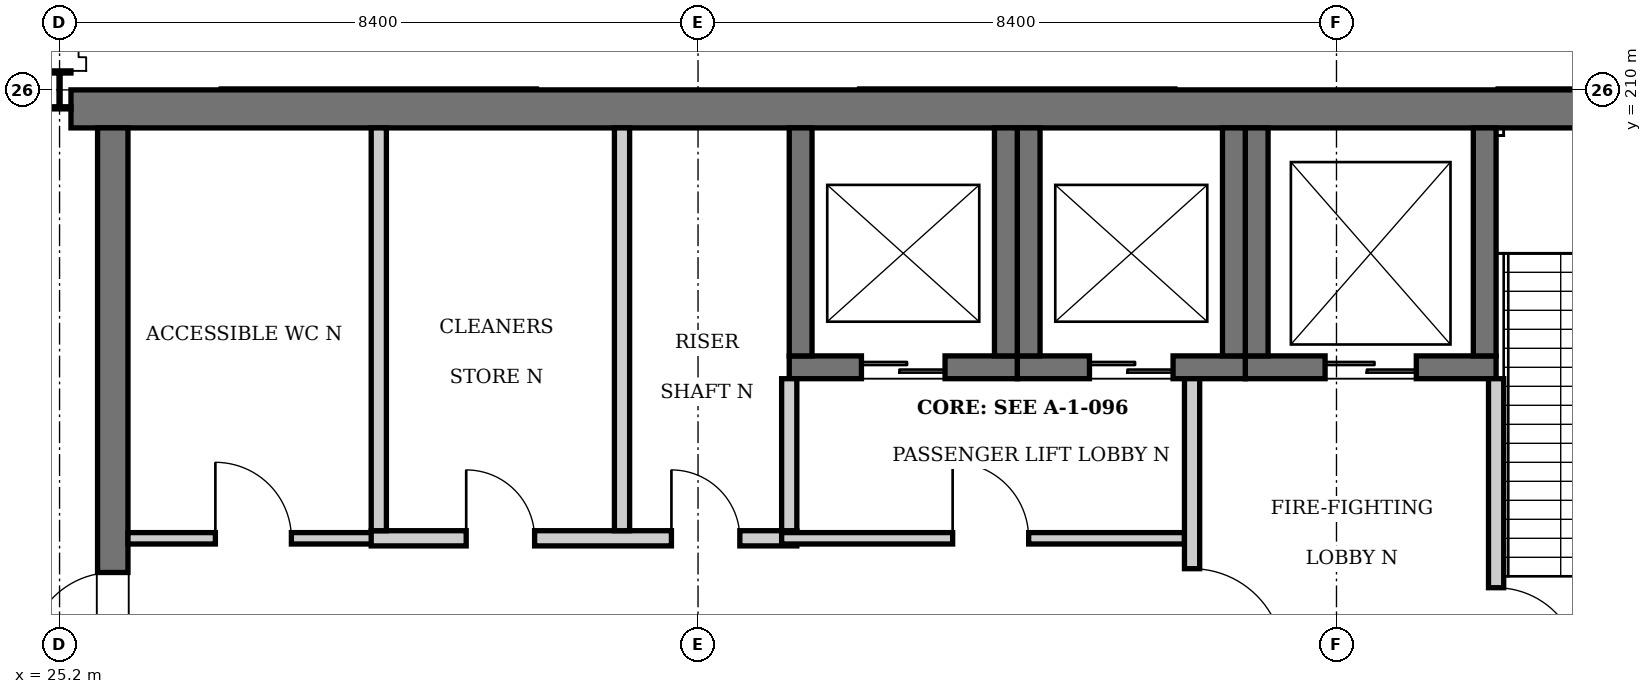
"""IFC4 building model, lengths in metres.
Left out: names, types, materials, properties, quantities, classifications, styles, units other than length and angle.
Written with IfcOpenShell. Run it as: python <this file> out.ifc"""

import sys

from ifc_helpers import new_model, si_unit, direction, frame, frame_2d, origin, origin_2d, place, context, subcontext, project, spatial, rectangle, i_section, extrude, element, fill, save


model = new_model("IFC4")
c1 = context("Model", 3, precision=1e-05, world=origin(), true_north=direction((0.0, 1.0)))
c2 = subcontext(c1, "Body", "Model", "MODEL_VIEW")
j1 = project(units=[si_unit("LENGTHUNIT", "METRE"), si_unit("PLANEANGLEUNIT", "RADIAN")], contexts=[c1])
p1 = place(None, origin())
s1 = spatial("IfcSite", under=j1, at=p1, CompositionType="ELEMENT")
p2 = place(p1, origin())
s2 = spatial("IfcBuilding", under=s1, at=p2, CompositionType="ELEMENT")
p3 = place(p2, origin())
s3 = spatial("IfcBuildingStorey", under=s2, at=p3, CompositionType="ELEMENT", Elevation=0.0)
p4 = place(p3, frame((25.2, 210.0, -0.7), z_axis=(0.0, 0.0, 1.0), x_axis=(1.0, 0.0, 0.0)))
e1 = element("IfcColumn", 1, at=p4, inside=s3, PredefinedType="COLUMN", context=c2, shape_type="SweptSolid", body=[
    extrude(i_section(OverallWidth=0.3, OverallDepth=0.5, WebThickness=0.014, FlangeThickness=0.028, at=origin_2d()), origin(), (0.0, 0.0, 1.0), 6.7),
])
p5 = place(p3, frame((25.35, 209.75, -0.7), z_axis=(0.0, 0.0, 1.0), x_axis=(1.0, 0.0, 0.0)))
e2 = element("IfcWall", 2, at=p5, inside=s3, PredefinedType="SHEAR", context=c2, shape_type="SweptSolid", body=[
    extrude(rectangle(XDim=25.043, YDim=0.5, at=frame_2d((12.521, 0.0))), origin(), (0.0, 0.0, 1.0), 6.7),
])
p6 = place(p3, frame((25.9, 202.1, -0.7), z_axis=(0.0, 0.0, 1.0), x_axis=(0.0, 1.0, 0.0)))
e3 = element("IfcWall", 3, at=p6, inside=s3, PredefinedType="SHEAR", context=c2, shape_type="SweptSolid", body=[
    extrude(rectangle(XDim=7.4, YDim=0.4, at=frame_2d((3.7, 0.0))), origin(), (0.0, 0.0, 1.0), 6.7),
])
p7 = place(p6, frame((0.45, 0.0, 0.7)))
e4 = element("IfcOpeningElement", 4, at=p7, cuts=e3, PredefinedType="OPENING", context=c2, shape_type="SweptSolid", body=[
    extrude(rectangle(XDim=1.1, YDim=2.4, at=frame_2d((0.55, 1.2))), frame((0.0, 0.21, 0.0), z_axis=(0.0, -1.0, 0.0), x_axis=(1.0, 0.0, 0.0)), (0.0, 0.0, 1.0), 0.42),
])
p8 = place(p3, frame((40.8, 206.35, -1.8), z_axis=(0.0, 0.0, 1.0), x_axis=(1.0, 0.0, 0.0)))
e5 = element("IfcWall", 5, at=p8, inside=s3, PredefinedType="SHEAR", context=c2, shape_type="SweptSolid", body=[
    extrude(rectangle(XDim=3.3, YDim=0.3, at=frame_2d((1.65, 0.0))), origin(), (0.0, 0.0, 1.0), 7.8),
])
p9 = place(p8, frame((1.05, 0.0, 1.8)))
e6 = element("IfcOpeningElement", 6, at=p9, cuts=e5, PredefinedType="OPENING", context=c2, shape_type="SweptSolid", body=[
    extrude(rectangle(XDim=1.2, YDim=2.1, at=frame_2d((0.6, 1.05))), frame((0.0, 0.16, 0.0), z_axis=(0.0, -1.0, 0.0), x_axis=(1.0, 0.0, 0.0)), (0.0, 0.0, 1.0), 0.32),
])
for number, where, z_axis, x_axis in (
    (7, (43.95, 206.5, -1.8), (0.0, 0.0, 1.0), (0.0, 1.0, 0.0)),
    (8, (40.95, 206.5, -1.8), (0.0, 0.0, 1.0), (0.0, 1.0, 0.0)),
):
    element("IfcWall", number, at=place(p3, frame(where, z_axis=z_axis, x_axis=x_axis)), inside=s3, PredefinedType="SHEAR", context=c2, shape_type="SweptSolid", body=[
        extrude(rectangle(XDim=3.0, YDim=0.3, at=frame_2d((1.5, 0.0))), origin(), (0.0, 0.0, 1.0), 7.8),
    ])
p10 = place(p3, frame((37.8, 206.35, -1.8), z_axis=(0.0, 0.0, 1.0), x_axis=(1.0, 0.0, 0.0)))
e9 = element("IfcWall", 9, at=p10, inside=s3, PredefinedType="SHEAR", context=c2, shape_type="SweptSolid", body=[
    extrude(rectangle(XDim=3.0, YDim=0.3, at=frame_2d((1.5, 0.0))), origin(), (0.0, 0.0, 1.0), 7.8),
])
p11 = place(p10, frame((0.95, 0.0, 1.8)))
e10 = element("IfcOpeningElement", 10, at=p11, cuts=e9, PredefinedType="OPENING", context=c2, shape_type="SweptSolid", body=[
    extrude(rectangle(XDim=1.1, YDim=2.1, at=frame_2d((0.55, 1.05))), frame((0.0, 0.16, 0.0), z_axis=(0.0, -1.0, 0.0), x_axis=(1.0, 0.0, 0.0)), (0.0, 0.0, 1.0), 0.32),
])
for number, where, z_axis, x_axis in (
    (11, (40.65, 206.5, -1.8), (0.0, 0.0, 1.0), (0.0, 1.0, 0.0)),
    (12, (37.95, 206.5, -1.8), (0.0, 0.0, 1.0), (0.0, 1.0, 0.0)),
):
    element("IfcWall", number, at=place(p3, frame(where, z_axis=z_axis, x_axis=x_axis)), inside=s3, PredefinedType="SHEAR", context=c2, shape_type="SweptSolid", body=[
        extrude(rectangle(XDim=3.0, YDim=0.3, at=frame_2d((1.5, 0.0))), origin(), (0.0, 0.0, 1.0), 7.8),
    ])
p12 = place(p3, frame((34.8, 206.35, -1.8), z_axis=(0.0, 0.0, 1.0), x_axis=(1.0, 0.0, 0.0)))
e13 = element("IfcWall", 13, at=p12, inside=s3, PredefinedType="SHEAR", context=c2, shape_type="SweptSolid", body=[
    extrude(rectangle(XDim=3.0, YDim=0.3, at=frame_2d((1.5, 0.0))), origin(), (0.0, 0.0, 1.0), 7.8),
])
p13 = place(p12, frame((0.95, 0.0, 1.8)))
e14 = element("IfcOpeningElement", 14, at=p13, cuts=e13, PredefinedType="OPENING", context=c2, shape_type="SweptSolid", body=[
    extrude(rectangle(XDim=1.1, YDim=2.1, at=frame_2d((0.55, 1.05))), frame((0.0, 0.16, 0.0), z_axis=(0.0, -1.0, 0.0), x_axis=(1.0, 0.0, 0.0)), (0.0, 0.0, 1.0), 0.32),
])
for number, where, z_axis, x_axis in (
    (15, (37.65, 206.5, -1.8), (0.0, 0.0, 1.0), (0.0, 1.0, 0.0)),
    (16, (34.95, 206.5, -1.8), (0.0, 0.0, 1.0), (0.0, 1.0, 0.0)),
):
    element("IfcWall", number, at=place(p3, frame(where, z_axis=z_axis, x_axis=x_axis)), inside=s3, PredefinedType="SHEAR", context=c2, shape_type="SweptSolid", body=[
        extrude(rectangle(XDim=3.0, YDim=0.3, at=frame_2d((1.5, 0.0))), origin(), (0.0, 0.0, 1.0), 7.8),
    ])
p14 = place(p3, frame((26.1, 204.1, 0.0), z_axis=(0.0, 0.0, 1.0), x_axis=(1.0, 0.0, 0.0)))
e17 = element("IfcWall", 17, at=p14, inside=s3, PredefinedType="PARTITIONING", context=c2, shape_type="SweptSolid", body=[
    extrude(rectangle(XDim=3.4, YDim=0.15, at=frame_2d((1.7, 0.0))), origin(), (0.0, 0.0, 1.0), 5.8),
])
p15 = place(p14, frame((1.15, 0.0, 0.0)))
e18 = element("IfcOpeningElement", 18, at=p15, cuts=e17, PredefinedType="OPENING", context=c2, shape_type="SweptSolid", body=[
    extrude(rectangle(XDim=1.0, YDim=2.1, at=frame_2d((0.5, 1.05))), frame((0.0, 0.085, 0.0), z_axis=(0.0, -1.0, 0.0), x_axis=(1.0, 0.0, 0.0)), (0.0, 0.0, 1.0), 0.17),
])
p16 = place(p3, frame((29.3, 204.1, 0.0), z_axis=(0.0, 0.0, 1.0), x_axis=(1.0, 0.0, 0.0)))
e19 = element("IfcWall", 19, at=p16, inside=s3, PredefinedType="PARTITIONING", context=c2, shape_type="SweptSolid", body=[
    extrude(rectangle(XDim=5.6, YDim=0.2, at=frame_2d((2.8, 0.0))), origin(), (0.0, 0.0, 1.0), 5.8),
])
p17 = place(p16, frame((3.95, 0.0, 0.0)))
e20 = element("IfcOpeningElement", 20, at=p17, cuts=e19, PredefinedType="OPENING", context=c2, shape_type="SweptSolid", body=[
    extrude(rectangle(XDim=0.9, YDim=2.1, at=frame_2d((0.45, 1.05))), frame((0.0, 0.11, 0.0), z_axis=(0.0, -1.0, 0.0), x_axis=(1.0, 0.0, 0.0)), (0.0, 0.0, 1.0), 0.22),
])
p18 = place(p16, frame((1.25, 0.0, 0.0)))
e21 = element("IfcOpeningElement", 21, at=p18, cuts=e19, PredefinedType="OPENING", context=c2, shape_type="SweptSolid", body=[
    extrude(rectangle(XDim=0.9, YDim=2.1, at=frame_2d((0.45, 1.05))), frame((0.0, 0.11, 0.0), z_axis=(0.0, -1.0, 0.0), x_axis=(1.0, 0.0, 0.0)), (0.0, 0.0, 1.0), 0.22),
])
p19 = place(p3, frame((34.7, 204.1, 0.0), z_axis=(0.0, 0.0, 1.0), x_axis=(1.0, 0.0, 0.0)))
e22 = element("IfcWall", 22, at=p19, inside=s3, PredefinedType="PARTITIONING", context=c2, shape_type="SweptSolid", body=[
    extrude(rectangle(XDim=5.3, YDim=0.15, at=frame_2d((2.65, 0.0))), origin(), (0.0, 0.0, 1.0), 5.8),
])
p20 = place(p19, frame((2.25, 0.0, 0.0)))
e23 = element("IfcOpeningElement", 23, at=p20, cuts=e22, PredefinedType="OPENING", context=c2, shape_type="SweptSolid", body=[
    extrude(rectangle(XDim=1.0, YDim=2.1, at=frame_2d((0.5, 1.05))), frame((0.0, 0.085, 0.0), z_axis=(0.0, -1.0, 0.0), x_axis=(1.0, 0.0, 0.0)), (0.0, 0.0, 1.0), 0.17),
])
for number, where, z_axis, x_axis in (
    (24, (29.4, 204.2, 0.0), (0.0, 0.0, 1.0), (0.0, 1.0, 0.0)),
    (25, (32.6, 204.2, 0.0), (0.0, 0.0, 1.0), (0.0, 1.0, 0.0)),
):
    element("IfcWall", number, at=place(p3, frame(where, z_axis=z_axis, x_axis=x_axis)), inside=s3, PredefinedType="PARTITIONING", context=c2, shape_type="SweptSolid", body=[
        extrude(rectangle(XDim=5.3, YDim=0.2, at=frame_2d((2.65, 0.0))), origin(), (0.0, 0.0, 1.0), 5.8),
    ])
p21 = place(p3, frame((34.8, 204.2, 0.0), z_axis=(0.0, 0.0, 1.0), x_axis=(0.0, 1.0, 0.0)))
e26 = element("IfcWall", 26, at=p21, inside=s3, PredefinedType="PARTITIONING", context=c2, shape_type="SweptSolid", body=[
    extrude(rectangle(XDim=2.0, YDim=0.2, at=frame_2d((1.0, 0.0))), origin(), (0.0, 0.0, 1.0), 5.8),
])
p22 = place(p3, frame((40.1, 202.1, 0.0), z_axis=(0.0, 0.0, 1.0), x_axis=(0.0, 1.0, 0.0)))
e27 = element("IfcWall", 27, at=p22, inside=s3, PredefinedType="PARTITIONING", context=c2, shape_type="SweptSolid", body=[
    extrude(rectangle(XDim=4.1, YDim=0.2, at=frame_2d((2.05, 0.0))), origin(), (0.0, 0.0, 1.0), 5.8),
])
p23 = place(p22, frame((0.4, 0.0, 0.0)))
e28 = element("IfcOpeningElement", 28, at=p23, cuts=e27, PredefinedType="OPENING", context=c2, shape_type="SweptSolid", body=[
    extrude(rectangle(XDim=1.2, YDim=2.4, at=frame_2d((0.6, 1.2))), frame((0.0, 0.11, 0.0), z_axis=(0.0, -1.0, 0.0), x_axis=(1.0, 0.0, 0.0)), (0.0, 0.0, 1.0), 0.22),
])
p24 = place(p3, frame((44.1, 202.1, 0.0), z_axis=(0.0, 0.0, 1.0), x_axis=(0.0, 1.0, 0.0)))
e29 = element("IfcWall", 29, at=p24, inside=s3, PredefinedType="PARTITIONING", context=c2, shape_type="SweptSolid", body=[
    extrude(rectangle(XDim=4.1, YDim=0.2, at=frame_2d((2.05, 0.0))), origin(), (0.0, 0.0, 1.0), 5.8),
])
p25 = place(p24, frame((0.25, 0.0, 0.0)))
e30 = element("IfcOpeningElement", 30, at=p25, cuts=e29, PredefinedType="OPENING", context=c2, shape_type="SweptSolid", body=[
    extrude(rectangle(XDim=1.1, YDim=2.4, at=frame_2d((0.55, 1.2))), frame((0.0, 0.11, 0.0), z_axis=(0.0, -1.0, 0.0), x_axis=(1.0, 0.0, 0.0)), (0.0, 0.0, 1.0), 0.22),
])
p26 = place(p7, origin())
e31 = element("IfcDoor", 31, at=p26, inside=s3, OperationType="SINGLE_SWING_LEFT", PredefinedType="DOOR", context=c2, shape_type="SweptSolid", body=[
    extrude(rectangle(XDim=1.1, YDim=2.4, at=frame_2d((0.55, 1.2))), frame((0.0, 0.025, 0.0), z_axis=(0.0, -1.0, 0.0), x_axis=(1.0, 0.0, 0.0)), (0.0, 0.0, 1.0), 0.05),
])
fill(e4, e31)
p27 = place(p20, origin())
e32 = element("IfcDoor", 32, at=p27, inside=s3, OperationType="SINGLE_SWING_LEFT", PredefinedType="DOOR", context=c2, shape_type="SweptSolid", body=[
    extrude(rectangle(XDim=1.0, YDim=2.1, at=frame_2d((0.5, 1.05))), frame((0.0, 0.025, 0.0), z_axis=(0.0, -1.0, 0.0), x_axis=(1.0, 0.0, 0.0)), (0.0, 0.0, 1.0), 0.05),
])
fill(e23, e32)
p28 = place(p23, frame((1.2, 0.0, 0.0), z_axis=(0.0, 0.0, 1.0), x_axis=(-1.0, 0.0, 0.0)))
e33 = element("IfcDoor", 33, at=p28, inside=s3, OperationType="SINGLE_SWING_RIGHT", PredefinedType="DOOR", context=c2, shape_type="SweptSolid", body=[
    extrude(rectangle(XDim=1.2, YDim=2.4, at=frame_2d((0.6, 1.2))), frame((0.0, 0.025, 0.0), z_axis=(0.0, -1.0, 0.0), x_axis=(1.0, 0.0, 0.0)), (0.0, 0.0, 1.0), 0.05),
])
fill(e28, e33)
p29 = place(p17, origin())
e34 = element("IfcDoor", 34, at=p29, inside=s3, OperationType="SINGLE_SWING_LEFT", PredefinedType="DOOR", context=c2, shape_type="SweptSolid", body=[
    extrude(rectangle(XDim=0.9, YDim=2.1, at=frame_2d((0.45, 1.05))), frame((0.0, 0.025, 0.0), z_axis=(0.0, -1.0, 0.0), x_axis=(1.0, 0.0, 0.0)), (0.0, 0.0, 1.0), 0.05),
])
fill(e20, e34)
p30 = place(p18, origin())
e35 = element("IfcDoor", 35, at=p30, inside=s3, OperationType="SINGLE_SWING_LEFT", PredefinedType="DOOR", context=c2, shape_type="SweptSolid", body=[
    extrude(rectangle(XDim=0.9, YDim=2.1, at=frame_2d((0.45, 1.05))), frame((0.0, 0.025, 0.0), z_axis=(0.0, -1.0, 0.0), x_axis=(1.0, 0.0, 0.0)), (0.0, 0.0, 1.0), 0.05),
])
fill(e21, e35)
p31 = place(p15, origin())
e36 = element("IfcDoor", 36, at=p31, inside=s3, OperationType="SINGLE_SWING_LEFT", PredefinedType="DOOR", context=c2, shape_type="SweptSolid", body=[
    extrude(rectangle(XDim=1.0, YDim=2.1, at=frame_2d((0.5, 1.05))), frame((0.0, 0.025, 0.0), z_axis=(0.0, -1.0, 0.0), x_axis=(1.0, 0.0, 0.0)), (0.0, 0.0, 1.0), 0.05),
])
fill(e18, e36)
p32 = place(p25, frame((1.1, 0.0, 0.0), z_axis=(0.0, 0.0, 1.0), x_axis=(-1.0, 0.0, 0.0)))
e37 = element("IfcDoor", 37, at=p32, inside=s3, OperationType="SINGLE_SWING_RIGHT", PredefinedType="DOOR", context=c2, shape_type="SweptSolid", body=[
    extrude(rectangle(XDim=1.1, YDim=2.4, at=frame_2d((0.55, 1.2))), frame((0.0, 0.025, 0.0), z_axis=(0.0, -1.0, 0.0), x_axis=(1.0, 0.0, 0.0)), (0.0, 0.0, 1.0), 0.05),
])
fill(e30, e37)
p33 = place(p9, origin())
e38 = element("IfcDoor", 38, at=p33, inside=s3, OperationType="SLIDING_TO_LEFT", PredefinedType="DOOR", context=c2, shape_type="SweptSolid", body=[
    extrude(rectangle(XDim=1.2, YDim=2.1, at=frame_2d((0.6, 1.05))), frame((0.0, 0.025, 0.0), z_axis=(0.0, -1.0, 0.0), x_axis=(1.0, 0.0, 0.0)), (0.0, 0.0, 1.0), 0.05),
])
fill(e6, e38)
p34 = place(p11, origin())
e39 = element("IfcDoor", 39, at=p34, inside=s3, OperationType="SLIDING_TO_LEFT", PredefinedType="DOOR", context=c2, shape_type="SweptSolid", body=[
    extrude(rectangle(XDim=1.1, YDim=2.1, at=frame_2d((0.55, 1.05))), frame((0.0, 0.025, 0.0), z_axis=(0.0, -1.0, 0.0), x_axis=(1.0, 0.0, 0.0)), (0.0, 0.0, 1.0), 0.05),
])
fill(e10, e39)
p35 = place(p13, origin())
e40 = element("IfcDoor", 40, at=p35, inside=s3, OperationType="SLIDING_TO_LEFT", PredefinedType="DOOR", context=c2, shape_type="SweptSolid", body=[
    extrude(rectangle(XDim=1.1, YDim=2.1, at=frame_2d((0.55, 1.05))), frame((0.0, 0.025, 0.0), z_axis=(0.0, -1.0, 0.0), x_axis=(1.0, 0.0, 0.0)), (0.0, 0.0, 1.0), 0.05),
])
fill(e14, e40)
save(model, sys.argv[1])
